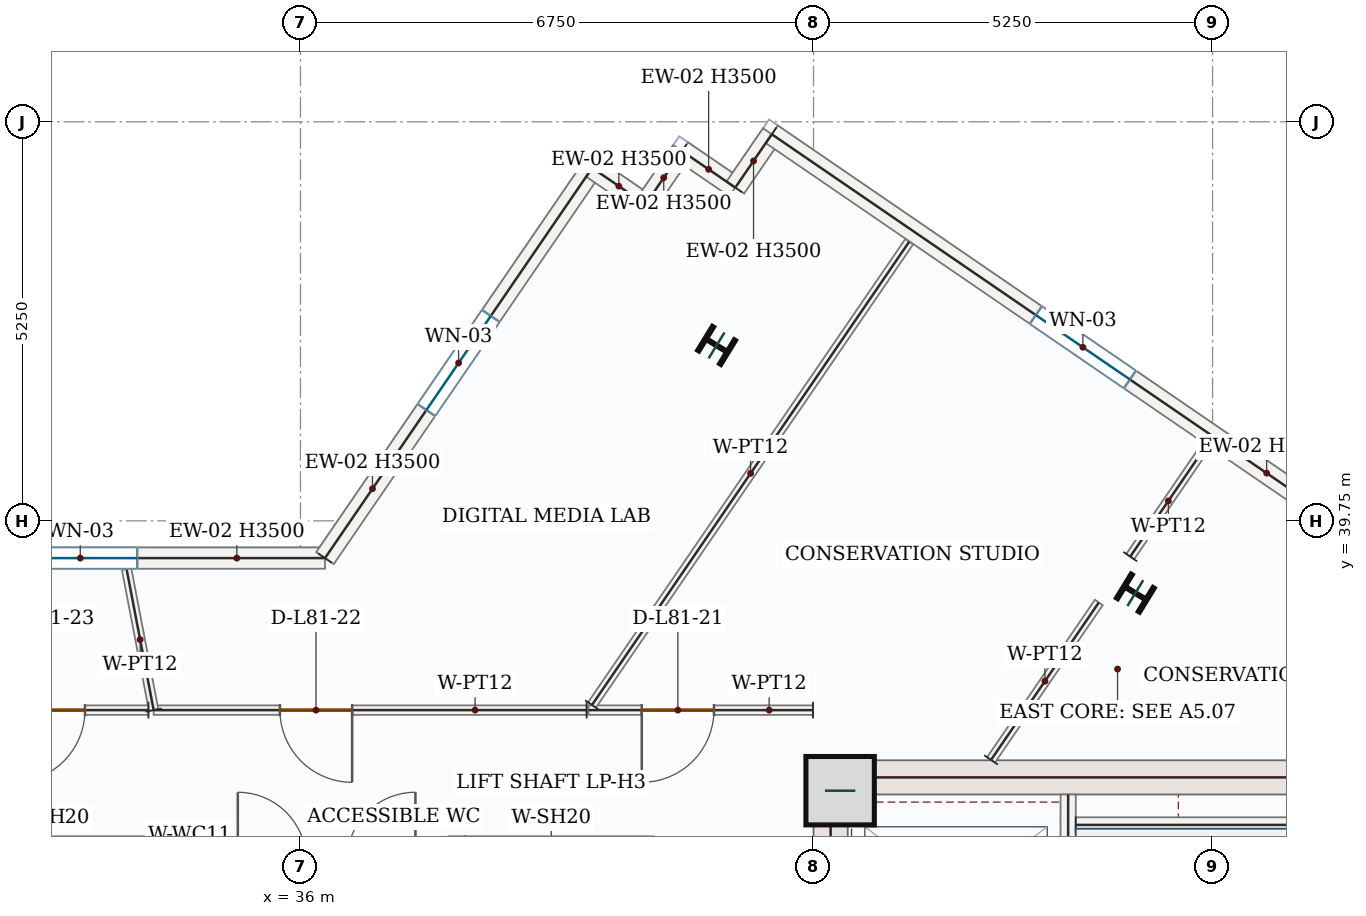
"""IFC4 building model, lengths in metres.
Left out: names, types, materials, properties, quantities, classifications, styles, units other than length and angle.
Written with IfcOpenShell. Run it as: python <this file> out.ifc"""

import sys

from ifc_helpers import new_model, si_unit, direction, frame, frame_2d, origin, origin_2d, place, context, subcontext, project, spatial, rectangle, i_section, extrude, source, transform, mapped, element, fill, save


model = new_model("IFC4")
c1 = context("Model", 3, precision=1e-05, world=origin(), true_north=direction((0.0, 1.0)))
c2 = subcontext(c1, "Body", "Model", "MODEL_VIEW")
j1 = project(units=[si_unit("LENGTHUNIT", "METRE"), si_unit("PLANEANGLEUNIT", "RADIAN")], contexts=[c1])
p1 = place(None, origin())
s1 = spatial("IfcSite", under=j1, at=p1, CompositionType="ELEMENT")
p2 = place(p1, origin())
s2 = spatial("IfcBuilding", under=s1, at=p2, CompositionType="ELEMENT")
p3 = place(p2, frame((0.0, 0.0, 334.8)))
s3 = spatial("IfcBuildingStorey", under=s2, at=p3, CompositionType="ELEMENT", Elevation=334.8)
p4 = place(p3, frame((42.975, 28.05, 0.0), z_axis=(0.0, 0.0, 1.0), x_axis=(0.0, 1.0, 0.0)))
e1 = element("IfcWall", 1, at=p4, inside=s3, PredefinedType="SHEAR", context=c2, shape_type="SweptSolid", body=[
    extrude(rectangle(XDim=8.55, YDim=0.45, at=frame_2d((4.275, 0.0))), origin(), (0.0, 0.0, 1.0), 3.5),
])
p5 = place(p4, frame((1.5, 0.0, 0.0)))
e2 = element("IfcOpeningElement", 2, at=p5, cuts=e1, PredefinedType="OPENING", context=c2, shape_type="SweptSolid", body=[
    extrude(rectangle(XDim=1.1, YDim=2.2, at=frame_2d((0.55, 1.1))), frame((0.0, 0.235, 0.0), z_axis=(0.0, -1.0, 0.0), x_axis=(1.0, 0.0, 0.0)), (0.0, 0.0, 1.0), 0.47),
])
m1 = source(origin(), c2, "Body", "SweptSolid", [
    extrude(rectangle(XDim=7.1, YDim=0.45, at=frame_2d((3.55, 0.0))), origin(), (0.0, 0.0, 1.0), 3.5),
])
p6 = place(p3, frame((43.2, 36.375, 0.0), z_axis=(0.0, 0.0, 1.0), x_axis=(1.0, 0.0, 0.0)))
e3 = element("IfcWall", 3, at=p6, inside=s3, PredefinedType="SHEAR", context=c2, shape_type="MappedRepresentation", body=[
    mapped(m1, transform((0.0, 0.0, 0.0), x_axis=(1.0, 0.0, 0.0), y_axis=(0.0, 1.0, 0.0), z_axis=(0.0, 0.0, 1.0), scale=1.0)),
])
m2 = source(origin(), c2, "Body", "SweptSolid", [
    extrude(rectangle(XDim=0.9, YDim=0.9, at=origin_2d()), origin(), (0.0, 0.0, 1.0), 3.75),
])
p7 = place(p3, frame((43.1, 36.2, 0.0), z_axis=(0.0, 0.0, 1.0), x_axis=(1.0, 0.0, 0.0)))
e4 = element("IfcColumn", 4, at=p7, inside=s3, PredefinedType="COLUMN", context=c2, shape_type="MappedRepresentation", body=[
    mapped(m2, transform((0.0, 0.0, 0.0), x_axis=(1.0, 0.0, 0.0), y_axis=(0.0, 1.0, 0.0), z_axis=(0.0, 0.0, 1.0), scale=1.0)),
])
m3 = source(origin(), c2, "Body", "SweptSolid", [
    extrude(i_section(OverallWidth=0.369, OverallDepth=0.356, WebThickness=0.011, FlangeThickness=0.018, FilletRadius=0.018, at=origin_2d()), origin(), (0.0, 0.0, 1.0), 3.75),
])
for number, where, z_axis, x_axis in (
    (5, (46.984, 38.8, 0.0), (0.0, 0.0, 1.0), (0.522, 0.853, 0.0)),
    (6, (41.475, 42.058, 0.0), (0.0, 0.0, 1.0), (0.522, 0.853, 0.0)),
):
    element("IfcColumn", number, at=place(p3, frame(where, z_axis=z_axis, x_axis=x_axis)), inside=s3, PredefinedType="COLUMN", context=c2, shape_type="MappedRepresentation", body=[
        mapped(m3, transform((0.0, 0.0, 0.0), x_axis=(1.0, 0.0, 0.0), y_axis=(0.0, 1.0, 0.0), z_axis=(0.0, 0.0, 1.0), scale=1.0)),
    ])
p8 = place(p3, frame((29.883, 39.26, 0.0), z_axis=(0.0, 0.0, 1.0), x_axis=(1.0, 0.0, 0.0)))
e7 = element("IfcWall", 7, at=p8, inside=s3, PredefinedType="SOLIDWALL", context=c2, shape_type="SweptSolid", body=[
    extrude(rectangle(XDim=6.44, YDim=0.28, at=frame_2d((3.22, 0.0))), origin(), (0.0, 0.0, 1.0), 3.5),
])
p9 = place(p8, frame((2.47, 0.0, 0.85)))
e8 = element("IfcOpeningElement", 8, at=p9, cuts=e7, PredefinedType="OPENING", context=c2, shape_type="SweptSolid", body=[
    extrude(rectangle(XDim=1.5, YDim=1.5, at=frame_2d((0.75, 0.75))), frame((0.0, 0.15, 0.0), z_axis=(0.0, -1.0, 0.0), x_axis=(1.0, 0.0, 0.0)), (0.0, 0.0, 1.0), 0.3),
])
p10 = place(p3, frame((36.323, 39.26, 0.0), z_axis=(0.0, 0.0, 1.0), x_axis=(0.564953982519, 0.825122413728, 0.0)))
e9 = element("IfcWall", 9, at=p10, inside=s3, PredefinedType="SOLIDWALL", context=c2, shape_type="SweptSolid", body=[
    extrude(rectangle(XDim=6.221, YDim=0.28, at=frame_2d((3.111, 0.0))), origin(), (0.0, 0.0, 1.0), 3.5),
])
p11 = place(p10, frame((2.361, 0.0, 0.85)))
e10 = element("IfcOpeningElement", 10, at=p11, cuts=e9, PredefinedType="OPENING", context=c2, shape_type="SweptSolid", body=[
    extrude(rectangle(XDim=1.5, YDim=1.5, at=frame_2d((0.75, 0.75))), frame((0.0, 0.15, 0.0), z_axis=(0.0, -1.0, 0.0), x_axis=(1.0, 0.0, 0.0)), (0.0, 0.0, 1.0), 0.3),
])
m4 = source(origin(), c2, "Body", "SweptSolid", [
    extrude(rectangle(XDim=0.85, YDim=0.28, at=frame_2d((0.425, 0.0))), origin(), (0.0, 0.0, 1.0), 3.5),
])
for number, where, z_axis, x_axis in (
    (11, (39.838, 44.394, 0.0), (0.0, 0.0, 1.0), (0.825, -0.565, 0.0)),
    (12, (40.539, 43.913, 0.0), (0.0, 0.0, 1.0), (0.565, 0.825, 0.0)),
    (13, (41.02, 44.615, 0.0), (0.0, 0.0, 1.0), (0.825, -0.565, 0.0)),
):
    element("IfcWall", number, at=place(p3, frame(where, z_axis=z_axis, x_axis=x_axis)), inside=s3, PredefinedType="SOLIDWALL", context=c2, shape_type="MappedRepresentation", body=[
        mapped(m4, transform((0.0, 0.0, 0.0), x_axis=(1.0, 0.0, 0.0), y_axis=(0.0, 1.0, 0.0), z_axis=(0.0, 0.0, 1.0), scale=1.0)),
    ])
m5 = source(origin(), c2, "Body", "SweptSolid", [
    extrude(rectangle(XDim=0.85, YDim=0.28, at=frame_2d((0.425, 0.0))), origin(), (0.0, 0.0, 1.0), 3.5),
])
p12 = place(p3, frame((41.721, 44.135, 0.0), z_axis=(0.0, 0.0, 1.0), x_axis=(0.565064897913, 0.825046459993, 0.0)))
e14 = element("IfcWall", 14, at=p12, inside=s3, PredefinedType="SOLIDWALL", context=c2, shape_type="MappedRepresentation", body=[
    mapped(m5, transform((0.0, 0.0, 0.0), x_axis=(1.0, 0.0, 0.0), y_axis=(0.0, 1.0, 0.0), z_axis=(0.0, 0.0, 1.0), scale=1.0)),
])
p13 = place(p3, frame((42.201, 44.836, 0.0), z_axis=(0.0, 0.0, 1.0), x_axis=(0.825121888295, -0.56495474992, 0.0)))
e15 = element("IfcWall", 15, at=p13, inside=s3, PredefinedType="SOLIDWALL", context=c2, shape_type="SweptSolid", body=[
    extrude(rectangle(XDim=9.92, YDim=0.28, at=frame_2d((4.96, 0.0))), origin(), (0.0, 0.0, 1.0), 3.5),
])
p14 = place(p13, frame((4.21, 0.0, 0.85)))
e16 = element("IfcOpeningElement", 16, at=p14, cuts=e15, PredefinedType="OPENING", context=c2, shape_type="SweptSolid", body=[
    extrude(rectangle(XDim=1.5, YDim=1.5, at=frame_2d((0.75, 0.75))), frame((0.0, 0.15, 0.0), z_axis=(0.0, -1.0, 0.0), x_axis=(1.0, 0.0, 0.0)), (0.0, 0.0, 1.0), 0.3),
])
p15 = place(p3, frame((46.1, 28.15, 0.0), z_axis=(0.0, 0.0, 1.0), x_axis=(0.0, 1.0, 0.0)))
e17 = element("IfcWall", 17, at=p15, inside=s3, PredefinedType="SOLIDWALL", context=c2, shape_type="SweptSolid", body=[
    extrude(rectangle(XDim=8.0, YDim=0.2, at=frame_2d((4.0, 0.0))), origin(), (0.0, 0.0, 1.0), 3.5),
])
p16 = place(p15, frame((0.4, 0.0, 0.0)))
e18 = element("IfcOpeningElement", 18, at=p16, cuts=e17, PredefinedType="OPENING", context=c2, shape_type="SweptSolid", body=[
    extrude(rectangle(XDim=1.05, YDim=2.15, at=frame_2d((0.525, 1.075))), frame((0.0, 0.11, 0.0), z_axis=(0.0, -1.0, 0.0), x_axis=(1.0, 0.0, 0.0)), (0.0, 0.0, 1.0), 0.22),
])
m6 = source(origin(), c2, "Body", "SweptSolid", [
    extrude(rectangle(XDim=3.25, YDim=0.2, at=frame_2d((1.625, 0.0))), origin(), (0.0, 0.0, 1.0), 3.5),
])
p17 = place(p3, frame((46.2, 35.75, 0.0), z_axis=(0.0, 0.0, 1.0), x_axis=(1.0, 0.0, 0.0)))
e19 = element("IfcWall", 19, at=p17, inside=s3, PredefinedType="SOLIDWALL", context=c2, shape_type="MappedRepresentation", body=[
    mapped(m6, transform((0.0, 0.0, 0.0), x_axis=(1.0, 0.0, 0.0), y_axis=(0.0, 1.0, 0.0), z_axis=(0.0, 0.0, 1.0), scale=1.0)),
])
m7 = source(origin(), c2, "Body", "SweptSolid", [
    extrude(rectangle(XDim=2.4, YDim=0.2, at=frame_2d((1.2, 0.0))), origin(), (0.0, 0.0, 1.0), 3.5),
])
for number, where, z_axis, x_axis in (
    (20, (33.95, 33.2, 0.0), (0.0, 0.0, 1.0), (0.0, 1.0, 0.0)),
    (21, (38.05, 33.2, 0.0), (0.0, 0.0, 1.0), (0.0, 1.0, 0.0)),
):
    element("IfcWall", number, at=place(p3, frame(where, z_axis=z_axis, x_axis=x_axis)), inside=s3, PredefinedType="SOLIDWALL", context=c2, shape_type="MappedRepresentation", body=[
        mapped(m7, transform((0.0, 0.0, 0.0), x_axis=(1.0, 0.0, 0.0), y_axis=(0.0, 1.0, 0.0), z_axis=(0.0, 0.0, 1.0), scale=1.0)),
    ])
p18 = place(p3, frame((40.55, 33.2, 0.0), z_axis=(0.0, 0.0, 1.0), x_axis=(0.0, 1.0, 0.0)))
e22 = element("IfcWall", 22, at=p18, inside=s3, PredefinedType="SOLIDWALL", context=c2, shape_type="SweptSolid", body=[
    extrude(rectangle(XDim=2.4, YDim=0.2, at=frame_2d((1.2, 0.0))), origin(), (0.0, 0.0, 1.0), 3.5),
])
p19 = place(p18, frame((0.65, 0.0, 0.0)))
e23 = element("IfcOpeningElement", 23, at=p19, cuts=e22, PredefinedType="OPENING", context=c2, shape_type="SweptSolid", body=[
    extrude(rectangle(XDim=1.1, YDim=2.15, at=frame_2d((0.55, 1.075))), frame((0.0, 0.11, 0.0), z_axis=(0.0, -1.0, 0.0), x_axis=(1.0, 0.0, 0.0)), (0.0, 0.0, 1.0), 0.22),
])
m8 = source(origin(), c2, "Body", "SweptSolid", [
    extrude(rectangle(XDim=2.511, YDim=0.125, at=frame_2d((1.255, 0.0))), origin(), (0.0, 0.0, 1.0), 3.5),
])
p20 = place(p3, frame((45.085, 36.605, 0.0), z_axis=(0.0, 0.0, 1.0), x_axis=(0.564980194272, 0.825104466162, 0.0)))
e24 = element("IfcWall", 24, at=p20, inside=s3, PredefinedType="PARTITIONING", context=c2, shape_type="MappedRepresentation", body=[
    mapped(m8, transform((0.0, 0.0, 0.0), x_axis=(1.0, 0.0, 0.0), y_axis=(0.0, 1.0, 0.0), z_axis=(0.0, 0.0, 1.0), scale=1.0)),
])
m9 = source(origin(), c2, "Body", "SweptSolid", [
    extrude(rectangle(XDim=1.775, YDim=0.125, at=frame_2d((0.888, 0.0))), origin(), (0.0, 0.0, 1.0), 3.5),
])
p21 = place(p3, frame((46.917, 39.28, 0.0), z_axis=(0.0, 0.0, 1.0), x_axis=(0.56509798207, 0.825023800057, 0.0)))
e25 = element("IfcWall", 25, at=p21, inside=s3, PredefinedType="PARTITIONING", context=c2, shape_type="MappedRepresentation", body=[
    mapped(m9, transform((0.0, 0.0, 0.0), x_axis=(1.0, 0.0, 0.0), y_axis=(0.0, 1.0, 0.0), z_axis=(0.0, 0.0, 1.0), scale=1.0)),
])
p22 = place(p3, frame((42.742, 37.26, 0.0), z_axis=(0.0, 0.0, 1.0), x_axis=(-0.999999996583, 8.2671957e-05, 0.0)))
e26 = element("IfcWall", 26, at=p22, inside=s3, PredefinedType="PARTITIONING", context=c2, shape_type="SweptSolid", body=[
    extrude(rectangle(XDim=2.953, YDim=0.125, at=frame_2d((1.477, 0.0))), origin(), (0.0, 0.0, 1.0), 3.5),
])
p23 = place(p22, frame((1.302, 0.0, 0.0)))
e27 = element("IfcOpeningElement", 27, at=p23, cuts=e26, PredefinedType="OPENING", context=c2, shape_type="SweptSolid", body=[
    extrude(rectangle(XDim=0.95, YDim=2.15, at=frame_2d((0.475, 1.075))), frame((0.0, 0.073, 0.0), z_axis=(0.0, -1.0, 0.0), x_axis=(1.0, 0.0, 0.0)), (0.0, 0.0, 1.0), 0.145),
])
m10 = source(origin(), c2, "Body", "SweptSolid", [
    extrude(rectangle(XDim=7.387, YDim=0.125, at=frame_2d((3.693, 0.0))), origin(), (0.0, 0.0, 1.0), 3.5),
])
p24 = place(p3, frame((39.835, 37.327, 0.0), z_axis=(0.0, 0.0, 1.0), x_axis=(0.564969427755, 0.8251118383, 0.0)))
e28 = element("IfcWall", 28, at=p24, inside=s3, PredefinedType="PARTITIONING", context=c2, shape_type="MappedRepresentation", body=[
    mapped(m10, transform((0.0, 0.0, 0.0), x_axis=(1.0, 0.0, 0.0), y_axis=(0.0, 1.0, 0.0), z_axis=(0.0, 0.0, 1.0), scale=1.0)),
])
p25 = place(p3, frame((39.765, 37.26, 0.0), z_axis=(0.0, 0.0, 1.0), x_axis=(-1.0, 0.0, 0.0)))
e29 = element("IfcWall", 29, at=p25, inside=s3, PredefinedType="PARTITIONING", context=c2, shape_type="SweptSolid", body=[
    extrude(rectangle(XDim=5.696, YDim=0.125, at=frame_2d((2.848, 0.0))), origin(), (0.0, 0.0, 1.0), 3.5),
])
p26 = place(p25, frame((3.085, 0.0, 0.0)))
e30 = element("IfcOpeningElement", 30, at=p26, cuts=e29, PredefinedType="OPENING", context=c2, shape_type="SweptSolid", body=[
    extrude(rectangle(XDim=0.95, YDim=2.15, at=frame_2d((0.475, 1.075))), frame((0.0, 0.073, 0.0), z_axis=(0.0, -1.0, 0.0), x_axis=(1.0, 0.0, 0.0)), (0.0, 0.0, 1.0), 0.145),
])
m11 = source(origin(), c2, "Body", "SweptSolid", [
    extrude(rectangle(XDim=1.889, YDim=0.125, at=frame_2d((0.944, 0.0))), origin(), (0.0, 0.0, 1.0), 3.5),
])
p27 = place(p3, frame((34.069, 37.26, 0.0), z_axis=(0.0, 0.0, 1.0), x_axis=(-0.188454265316, 0.982081966989, 0.0)))
e31 = element("IfcWall", 31, at=p27, inside=s3, PredefinedType="PARTITIONING", context=c2, shape_type="MappedRepresentation", body=[
    mapped(m11, transform((0.0, 0.0, 0.0), x_axis=(1.0, 0.0, 0.0), y_axis=(0.0, 1.0, 0.0), z_axis=(0.0, 0.0, 1.0), scale=1.0)),
])
p28 = place(p3, frame((34.0, 37.26, 0.0), z_axis=(0.0, 0.0, 1.0), x_axis=(-0.999999994709, -0.000102870075, 0.0)))
e32 = element("IfcWall", 32, at=p28, inside=s3, PredefinedType="PARTITIONING", context=c2, shape_type="SweptSolid", body=[
    extrude(rectangle(XDim=4.747, YDim=0.125, at=frame_2d((2.373, 0.0))), origin(), (0.0, 0.0, 1.0), 3.5),
])
p29 = place(p28, frame((0.835, 0.0, 0.0)))
e33 = element("IfcOpeningElement", 33, at=p29, cuts=e32, PredefinedType="OPENING", context=c2, shape_type="SweptSolid", body=[
    extrude(rectangle(XDim=0.95, YDim=2.15, at=frame_2d((0.475, 1.075))), frame((0.0, 0.073, 0.0), z_axis=(0.0, -1.0, 0.0), x_axis=(1.0, 0.0, 0.0)), (0.0, 0.0, 1.0), 0.145),
])
m12 = source(origin(), c2, "Body", "SweptSolid", [
    extrude(rectangle(XDim=1.5, YDim=1.5, at=frame_2d((0.75, 0.75))), frame((0.0, 0.03, 0.0), z_axis=(0.0, -1.0, 0.0), x_axis=(1.0, 0.0, 0.0)), (0.0, 0.0, 1.0), 0.06),
])
p30 = place(p9, origin())
e34 = element("IfcWindow", 34, at=p30, inside=s3, PartitioningType="SINGLE_PANEL", PredefinedType="WINDOW", context=c2, shape_type="MappedRepresentation", body=[
    mapped(m12, transform((0.0, 0.0, 0.0), x_axis=(1.0, 0.0, 0.0), y_axis=(0.0, 1.0, 0.0), z_axis=(0.0, 0.0, 1.0), scale=1.0)),
])
fill(e8, e34)
p31 = place(p11, origin())
e35 = element("IfcWindow", 35, at=p31, inside=s3, PartitioningType="SINGLE_PANEL", PredefinedType="WINDOW", context=c2, shape_type="MappedRepresentation", body=[
    mapped(m12, transform((0.0, 0.0, 0.0), x_axis=(1.0, 0.0, 0.0), y_axis=(0.0, 1.0, 0.0), z_axis=(0.0, 0.0, 1.0), scale=1.0)),
])
fill(e10, e35)
p32 = place(p14, origin())
e36 = element("IfcWindow", 36, at=p32, inside=s3, PartitioningType="SINGLE_PANEL", PredefinedType="WINDOW", context=c2, shape_type="MappedRepresentation", body=[
    mapped(m12, transform((0.0, 0.0, 0.0), x_axis=(1.0, 0.0, 0.0), y_axis=(0.0, 1.0, 0.0), z_axis=(0.0, 0.0, 1.0), scale=1.0)),
])
fill(e16, e36)
m13 = source(origin(), c2, "Body", "SweptSolid", [
    extrude(rectangle(XDim=0.95, YDim=2.15, at=frame_2d((0.475, 1.075))), frame((0.0, 0.025, 0.0), z_axis=(0.0, -1.0, 0.0), x_axis=(1.0, 0.0, 0.0)), (0.0, 0.0, 1.0), 0.05),
])
p33 = place(p23, origin())
e37 = element("IfcDoor", 37, at=p33, inside=s3, OperationType="SINGLE_SWING_RIGHT", PredefinedType="DOOR", context=c2, shape_type="MappedRepresentation", body=[
    mapped(m13, transform((0.0, 0.0, 0.0), x_axis=(1.0, 0.0, 0.0), y_axis=(0.0, 1.0, 0.0), z_axis=(0.0, 0.0, 1.0), scale=1.0)),
])
fill(e27, e37)
p34 = place(p26, origin())
e38 = element("IfcDoor", 38, at=p34, inside=s3, OperationType="SINGLE_SWING_LEFT", PredefinedType="DOOR", context=c2, shape_type="MappedRepresentation", body=[
    mapped(m13, transform((0.0, 0.0, 0.0), x_axis=(1.0, 0.0, 0.0), y_axis=(0.0, 1.0, 0.0), z_axis=(0.0, 0.0, 1.0), scale=1.0)),
])
fill(e30, e38)
p35 = place(p29, origin())
e39 = element("IfcDoor", 39, at=p35, inside=s3, OperationType="SINGLE_SWING_RIGHT", PredefinedType="DOOR", context=c2, shape_type="MappedRepresentation", body=[
    mapped(m13, transform((0.0, 0.0, 0.0), x_axis=(1.0, 0.0, 0.0), y_axis=(0.0, 1.0, 0.0), z_axis=(0.0, 0.0, 1.0), scale=1.0)),
])
fill(e33, e39)
save(model, sys.argv[1])
